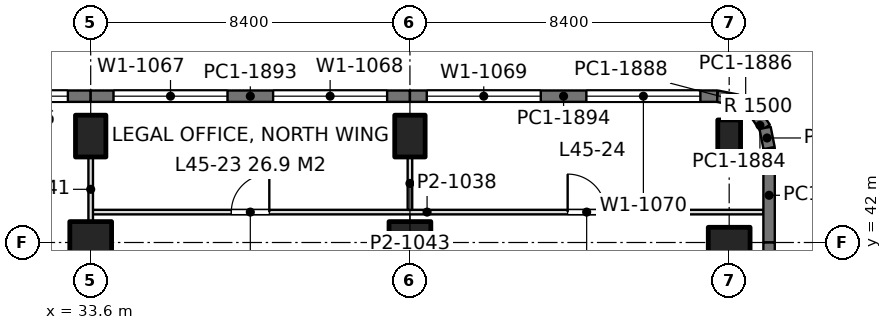
"""IFC4 building model, lengths in metres.
Left out: names, types, materials, properties, quantities, classifications, styles, units other than length and angle.
Written with IfcOpenShell. Run it as: python <this file> out.ifc"""

import sys

from ifc_helpers import new_model, si_unit, direction, frame, frame_2d, origin, origin_2d, place, context, subcontext, project, spatial, rectangle, extrude, element, fill, save


model = new_model("IFC4")
c1 = context("Model", 3, precision=1e-05, world=origin(), true_north=direction((0.0, 1.0)))
c2 = subcontext(c1, "Body", "Model", "MODEL_VIEW")
j1 = project(units=[si_unit("LENGTHUNIT", "METRE"), si_unit("PLANEANGLEUNIT", "RADIAN")], contexts=[c1])
p1 = place(None, origin())
s1 = spatial("IfcSite", under=j1, at=p1, CompositionType="ELEMENT")
p2 = place(p1, origin())
s2 = spatial("IfcBuilding", under=s1, at=p2, CompositionType="ELEMENT")
p3 = place(p2, frame((0.0, 0.0, 198.6)))
s3 = spatial("IfcBuildingStorey", under=s2, at=p3, CompositionType="ELEMENT", Elevation=198.6)
p4 = place(p3, frame((33.6, 42.0, 0.0), z_axis=(0.0, 0.0, 1.0), x_axis=(1.0, 0.0, 0.0)))
e1 = element("IfcColumn", 1, at=p4, inside=s3, PredefinedType="COLUMN", context=c2, shape_type="SweptSolid", body=[
    extrude(rectangle(XDim=1.1, YDim=1.1, at=origin_2d()), origin(), (0.0, 0.0, 1.0), 4.2),
])
p5 = place(p3, frame((33.6, 44.8, 0.0), z_axis=(0.0, 0.0, 1.0), x_axis=(1.0, 0.0, 0.0)))
e2 = element("IfcColumn", 2, at=p5, inside=s3, PredefinedType="COLUMN", context=c2, shape_type="SweptSolid", body=[
    extrude(rectangle(XDim=0.8, YDim=1.1, at=origin_2d()), origin(), (0.0, 0.0, 1.0), 4.2),
])
p6 = place(p3, frame((42.0, 42.0, 0.0), z_axis=(0.0, 0.0, 1.0), x_axis=(1.0, 0.0, 0.0)))
e3 = element("IfcColumn", 3, at=p6, inside=s3, PredefinedType="COLUMN", context=c2, shape_type="SweptSolid", body=[
    extrude(rectangle(XDim=1.1, YDim=1.1, at=origin_2d()), origin(), (0.0, 0.0, 1.0), 4.2),
])
for number, where, z_axis, x_axis in (
    (4, (42.0, 44.8, 0.0), (0.0, 0.0, 1.0), (1.0, 0.0, 0.0)),
    (5, (50.4, 42.0, 0.0), (0.0, 0.0, 1.0), (0.0, 1.0, 0.0)),
):
    element("IfcColumn", number, at=place(p3, frame(where, z_axis=z_axis, x_axis=x_axis)), inside=s3, PredefinedType="COLUMN", context=c2, shape_type="SweptSolid", body=[
        extrude(rectangle(XDim=0.8, YDim=1.1, at=origin_2d()), origin(), (0.0, 0.0, 1.0), 4.2),
    ])
p7 = place(p3, frame((50.4, 44.8, 0.0), z_axis=(0.0, 0.0, 1.0), x_axis=(1.0, 0.0, 0.0)))
e6 = element("IfcColumn", 6, at=p7, inside=s3, PredefinedType="COLUMN", context=c2, shape_type="SweptSolid", body=[
    extrude(rectangle(XDim=0.6, YDim=0.85, at=origin_2d()), origin(), (0.0, 0.0, 1.0), 4.2),
])
p8 = place(p3, frame((25.2, 45.85, 0.0), z_axis=(0.0, 0.0, 1.0), x_axis=(1.0, 0.0, 0.0)))
e7 = element("IfcWall", 7, at=p8, inside=s3, PredefinedType="SOLIDWALL", context=c2, shape_type="SweptSolid", body=[
    extrude(rectangle(XDim=8.4, YDim=0.3, at=frame_2d((4.2, 0.0))), origin(), (0.0, 0.0, 1.0), 4.05),
])
p9 = place(p8, frame((0.6, 0.0, 0.9)))
e8 = element("IfcOpeningElement", 8, at=p9, cuts=e7, PredefinedType="OPENING", context=c2, shape_type="SweptSolid", body=[
    extrude(rectangle(XDim=3.0, YDim=1.9, at=frame_2d((1.5, 0.95))), frame((0.0, 0.16, 0.0), z_axis=(0.0, -1.0, 0.0), x_axis=(1.0, 0.0, 0.0)), (0.0, 0.0, 1.0), 0.32),
])
p10 = place(p8, frame((4.8, 0.0, 0.9)))
e9 = element("IfcOpeningElement", 9, at=p10, cuts=e7, PredefinedType="OPENING", context=c2, shape_type="SweptSolid", body=[
    extrude(rectangle(XDim=3.0, YDim=1.9, at=frame_2d((1.5, 0.95))), frame((0.0, 0.16, 0.0), z_axis=(0.0, -1.0, 0.0), x_axis=(1.0, 0.0, 0.0)), (0.0, 0.0, 1.0), 0.32),
])
p11 = place(p3, frame((33.6, 45.85, 0.0), z_axis=(0.0, 0.0, 1.0), x_axis=(1.0, 0.0, 0.0)))
e10 = element("IfcWall", 10, at=p11, inside=s3, PredefinedType="SOLIDWALL", context=c2, shape_type="SweptSolid", body=[
    extrude(rectangle(XDim=8.4, YDim=0.3, at=frame_2d((4.2, 0.0))), origin(), (0.0, 0.0, 1.0), 4.05),
])
p12 = place(p11, frame((0.6, 0.0, 0.9)))
e11 = element("IfcOpeningElement", 11, at=p12, cuts=e10, PredefinedType="OPENING", context=c2, shape_type="SweptSolid", body=[
    extrude(rectangle(XDim=3.0, YDim=1.9, at=frame_2d((1.5, 0.95))), frame((0.0, 0.16, 0.0), z_axis=(0.0, -1.0, 0.0), x_axis=(1.0, 0.0, 0.0)), (0.0, 0.0, 1.0), 0.32),
])
p13 = place(p11, frame((4.8, 0.0, 0.9)))
e12 = element("IfcOpeningElement", 12, at=p13, cuts=e10, PredefinedType="OPENING", context=c2, shape_type="SweptSolid", body=[
    extrude(rectangle(XDim=3.0, YDim=1.9, at=frame_2d((1.5, 0.95))), frame((0.0, 0.16, 0.0), z_axis=(0.0, -1.0, 0.0), x_axis=(1.0, 0.0, 0.0)), (0.0, 0.0, 1.0), 0.32),
])
p14 = place(p3, frame((42.0, 45.85, 0.0), z_axis=(0.0, 0.0, 1.0), x_axis=(1.0, 0.0, 0.0)))
e13 = element("IfcWall", 13, at=p14, inside=s3, PredefinedType="SOLIDWALL", context=c2, shape_type="SweptSolid", body=[
    extrude(rectangle(XDim=8.085, YDim=0.3, at=frame_2d((4.042, 0.0))), origin(), (0.0, 0.0, 1.0), 4.05),
])
p15 = place(p14, frame((0.443, 0.0, 0.9)))
e14 = element("IfcOpeningElement", 14, at=p15, cuts=e13, PredefinedType="OPENING", context=c2, shape_type="SweptSolid", body=[
    extrude(rectangle(XDim=3.0, YDim=1.9, at=frame_2d((1.5, 0.95))), frame((0.0, 0.16, 0.0), z_axis=(0.0, -1.0, 0.0), x_axis=(1.0, 0.0, 0.0)), (0.0, 0.0, 1.0), 0.32),
])
p16 = place(p14, frame((4.643, 0.0, 0.9)))
e15 = element("IfcOpeningElement", 15, at=p16, cuts=e13, PredefinedType="OPENING", context=c2, shape_type="SweptSolid", body=[
    extrude(rectangle(XDim=3.0, YDim=1.9, at=frame_2d((1.5, 0.95))), frame((0.0, 0.16, 0.0), z_axis=(0.0, -1.0, 0.0), x_axis=(1.0, 0.0, 0.0)), (0.0, 0.0, 1.0), 0.32),
])
p17 = place(p3, frame((50.085, 45.85, 0.0), z_axis=(0.0, 0.0, 1.0), x_axis=(0.980702050465, -0.1955082817, 0.0)))
e16 = element("IfcWall", 16, at=p17, inside=s3, PredefinedType="SOLIDWALL", context=c2, shape_type="SweptSolid", body=[
    extrude(rectangle(XDim=0.541, YDim=0.3, at=frame_2d((0.271, 0.0))), origin(), (0.0, 0.0, 1.0), 4.05),
])
p18 = place(p3, frame((50.615, 45.744, 0.0), z_axis=(0.0, 0.0, 1.0), x_axis=(0.831692711774, -0.555236195849, 0.0)))
e17 = element("IfcWall", 17, at=p18, inside=s3, PredefinedType="SOLIDWALL", context=c2, shape_type="SweptSolid", body=[
    extrude(rectangle(XDim=0.525, YDim=0.3, at=frame_2d((0.263, 0.0))), origin(), (0.0, 0.0, 1.0), 4.05),
])
p19 = place(p3, frame((51.052, 45.453, 0.0), z_axis=(0.0, 0.0, 1.0), x_axis=(0.55534295404, -0.831621430339, 0.0)))
e18 = element("IfcWall", 18, at=p19, inside=s3, PredefinedType="SOLIDWALL", context=c2, shape_type="SweptSolid", body=[
    extrude(rectangle(XDim=0.526, YDim=0.3, at=frame_2d((0.263, 0.0))), origin(), (0.0, 0.0, 1.0), 4.05),
])
p20 = place(p3, frame((51.344, 45.015, 0.0), z_axis=(0.0, 0.0, 1.0), x_axis=(0.195073962632, -0.980788534345, 0.0)))
e19 = element("IfcWall", 19, at=p20, inside=s3, PredefinedType="SOLIDWALL", context=c2, shape_type="SweptSolid", body=[
    extrude(rectangle(XDim=0.541, YDim=0.3, at=frame_2d((0.271, 0.0))), origin(), (0.0, 0.0, 1.0), 4.05),
])
p21 = place(p3, frame((51.45, 44.485, 0.0), z_axis=(0.0, 0.0, 1.0), x_axis=(0.0, -1.0, 0.0)))
e20 = element("IfcWall", 20, at=p21, inside=s3, PredefinedType="SOLIDWALL", context=c2, shape_type="SweptSolid", body=[
    extrude(rectangle(XDim=2.485, YDim=0.3, at=frame_2d((1.243, 0.0))), origin(), (0.0, 0.0, 1.0), 4.05),
])
p22 = place(p3, frame((51.45, 42.0, 0.0), z_axis=(0.0, 0.0, 1.0), x_axis=(0.0, -1.0, 0.0)))
e21 = element("IfcWall", 21, at=p22, inside=s3, PredefinedType="SOLIDWALL", context=c2, shape_type="SweptSolid", body=[
    extrude(rectangle(XDim=4.275, YDim=0.3, at=frame_2d((2.137, 0.0))), origin(), (0.0, 0.0, 1.0), 4.05),
])
p23 = place(p22, frame((0.938, 0.0, 0.9)))
e22 = element("IfcOpeningElement", 22, at=p23, cuts=e21, PredefinedType="OPENING", context=c2, shape_type="SweptSolid", body=[
    extrude(rectangle(XDim=2.4, YDim=1.9, at=frame_2d((1.2, 0.95))), frame((0.0, 0.16, 0.0), z_axis=(0.0, -1.0, 0.0), x_axis=(1.0, 0.0, 0.0)), (0.0, 0.0, 1.0), 0.32),
])
p24 = place(p3, frame((33.6, 42.8, 0.0), z_axis=(0.0, 0.0, 1.0), x_axis=(1.0, 0.0, 0.0)))
e23 = element("IfcWall", 23, at=p24, inside=s3, PredefinedType="PARTITIONING", context=c2, shape_type="SweptSolid", body=[
    extrude(rectangle(XDim=17.702, YDim=0.12, at=frame_2d((8.851, 0.0))), origin(), (0.0, 0.0, 1.0), 3.56),
])
p25 = place(p24, frame((3.7, 0.0, 0.0)))
e24 = element("IfcOpeningElement", 24, at=p25, cuts=e23, PredefinedType="OPENING", context=c2, shape_type="SweptSolid", body=[
    extrude(rectangle(XDim=1.0, YDim=2.4, at=frame_2d((0.5, 1.2))), frame((0.0, 0.07, 0.0), z_axis=(0.0, -1.0, 0.0), x_axis=(1.0, 0.0, 0.0)), (0.0, 0.0, 1.0), 0.14),
])
p26 = place(p24, frame((12.55, 0.0, 0.0)))
e25 = element("IfcOpeningElement", 25, at=p26, cuts=e23, PredefinedType="OPENING", context=c2, shape_type="SweptSolid", body=[
    extrude(rectangle(XDim=1.0, YDim=2.4, at=frame_2d((0.5, 1.2))), frame((0.0, 0.07, 0.0), z_axis=(0.0, -1.0, 0.0), x_axis=(1.0, 0.0, 0.0)), (0.0, 0.0, 1.0), 0.14),
])
p27 = place(p3, frame((33.6, 42.548, 0.0), z_axis=(0.0, 0.0, 1.0), x_axis=(0.0, 1.0, 0.0)))
e26 = element("IfcWall", 26, at=p27, inside=s3, PredefinedType="PARTITIONING", context=c2, shape_type="SweptSolid", body=[
    extrude(rectangle(XDim=1.703, YDim=0.12, at=frame_2d((0.852, 0.0))), origin(), (0.0, 0.0, 1.0), 3.69),
])
p28 = place(p3, frame((42.0, 42.858, 0.0), z_axis=(0.0, 0.0, 1.0), x_axis=(0.0, 1.0, 0.0)))
e27 = element("IfcWall", 27, at=p28, inside=s3, PredefinedType="PARTITIONING", context=c2, shape_type="SweptSolid", body=[
    extrude(rectangle(XDim=1.393, YDim=0.12, at=frame_2d((0.697, 0.0))), origin(), (0.0, 0.0, 1.0), 3.69),
])
p29 = place(p10, origin())
e28 = element("IfcWindow", 28, at=p29, inside=s3, PartitioningType="SINGLE_PANEL", PredefinedType="WINDOW", context=c2, shape_type="SweptSolid", body=[
    extrude(rectangle(XDim=3.0, YDim=1.9, at=frame_2d((1.5, 0.95))), frame((0.0, 0.03, 0.0), z_axis=(0.0, -1.0, 0.0), x_axis=(1.0, 0.0, 0.0)), (0.0, 0.0, 1.0), 0.06),
])
fill(e9, e28)
p30 = place(p12, origin())
e29 = element("IfcWindow", 29, at=p30, inside=s3, PartitioningType="SINGLE_PANEL", PredefinedType="WINDOW", context=c2, shape_type="SweptSolid", body=[
    extrude(rectangle(XDim=3.0, YDim=1.9, at=frame_2d((1.5, 0.95))), frame((0.0, 0.03, 0.0), z_axis=(0.0, -1.0, 0.0), x_axis=(1.0, 0.0, 0.0)), (0.0, 0.0, 1.0), 0.06),
])
fill(e11, e29)
p31 = place(p13, origin())
e30 = element("IfcWindow", 30, at=p31, inside=s3, PartitioningType="SINGLE_PANEL", PredefinedType="WINDOW", context=c2, shape_type="SweptSolid", body=[
    extrude(rectangle(XDim=3.0, YDim=1.9, at=frame_2d((1.5, 0.95))), frame((0.0, 0.03, 0.0), z_axis=(0.0, -1.0, 0.0), x_axis=(1.0, 0.0, 0.0)), (0.0, 0.0, 1.0), 0.06),
])
fill(e12, e30)
p32 = place(p15, origin())
e31 = element("IfcWindow", 31, at=p32, inside=s3, PartitioningType="SINGLE_PANEL", PredefinedType="WINDOW", context=c2, shape_type="SweptSolid", body=[
    extrude(rectangle(XDim=3.0, YDim=1.9, at=frame_2d((1.5, 0.95))), frame((0.0, 0.03, 0.0), z_axis=(0.0, -1.0, 0.0), x_axis=(1.0, 0.0, 0.0)), (0.0, 0.0, 1.0), 0.06),
])
fill(e14, e31)
p33 = place(p16, origin())
e32 = element("IfcWindow", 32, at=p33, inside=s3, PartitioningType="SINGLE_PANEL", PredefinedType="WINDOW", context=c2, shape_type="SweptSolid", body=[
    extrude(rectangle(XDim=3.0, YDim=1.9, at=frame_2d((1.5, 0.95))), frame((0.0, 0.03, 0.0), z_axis=(0.0, -1.0, 0.0), x_axis=(1.0, 0.0, 0.0)), (0.0, 0.0, 1.0), 0.06),
])
fill(e15, e32)
p34 = place(p25, origin())
e33 = element("IfcDoor", 33, at=p34, inside=s3, OperationType="SINGLE_SWING_RIGHT", PredefinedType="DOOR", context=c2, shape_type="SweptSolid", body=[
    extrude(rectangle(XDim=1.0, YDim=2.4, at=frame_2d((0.5, 1.2))), frame((0.0, 0.025, 0.0), z_axis=(0.0, -1.0, 0.0), x_axis=(1.0, 0.0, 0.0)), (0.0, 0.0, 1.0), 0.05),
])
fill(e24, e33)
p35 = place(p26, origin())
e34 = element("IfcDoor", 34, at=p35, inside=s3, OperationType="SINGLE_SWING_LEFT", PredefinedType="DOOR", context=c2, shape_type="SweptSolid", body=[
    extrude(rectangle(XDim=1.0, YDim=2.4, at=frame_2d((0.5, 1.2))), frame((0.0, 0.025, 0.0), z_axis=(0.0, -1.0, 0.0), x_axis=(1.0, 0.0, 0.0)), (0.0, 0.0, 1.0), 0.05),
])
fill(e25, e34)
save(model, sys.argv[1])
